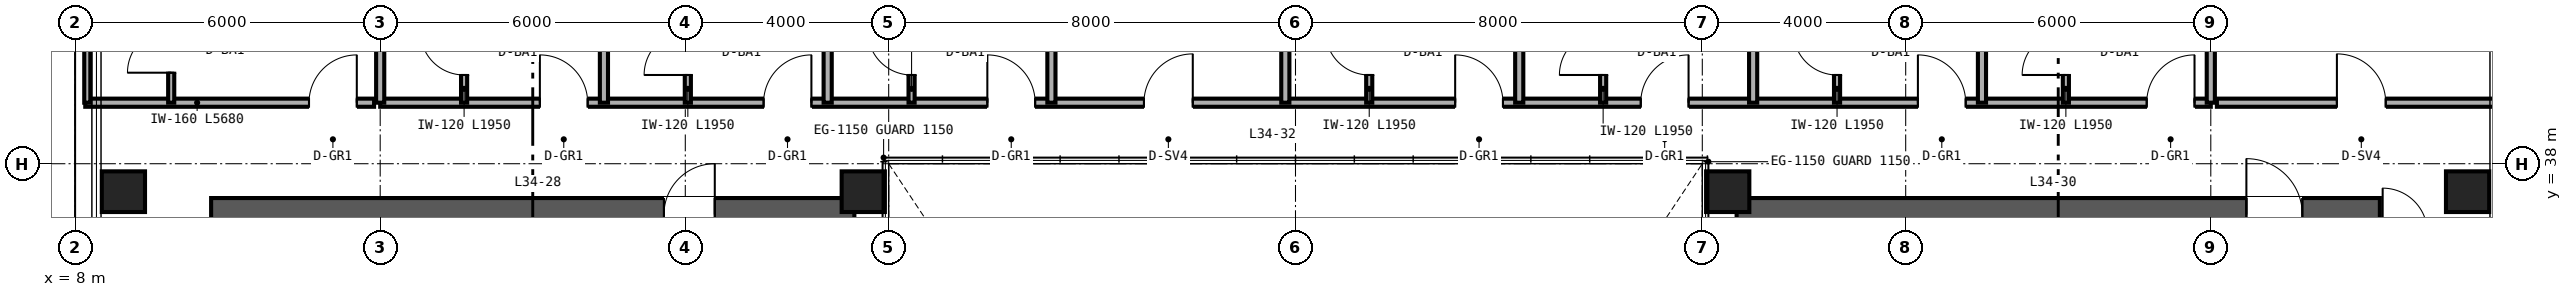
"""IFC4 building model, lengths in metres.
Left out: names, types, materials, properties, quantities, classifications, styles, units other than length and angle.
Written with IfcOpenShell. Run it as: python <this file> out.ifc"""

import sys

from ifc_helpers import new_model, si_unit, direction, frame, frame_2d, origin, origin_2d, place, context, subcontext, project, spatial, rectangle, hollow_rectangle, extrude, source, transform, mapped, element, fill, save


model = new_model("IFC4")
c1 = context("Model", 3, precision=1e-05, world=origin(), true_north=direction((0.0, 1.0)))
c2 = subcontext(c1, "Body", "Model", "MODEL_VIEW")
j1 = project(units=[si_unit("LENGTHUNIT", "METRE"), si_unit("PLANEANGLEUNIT", "RADIAN")], contexts=[c1])
p1 = place(None, origin())
s1 = spatial("IfcSite", under=j1, at=p1, CompositionType="ELEMENT")
p2 = place(p1, origin())
s2 = spatial("IfcBuilding", under=s1, at=p2, CompositionType="ELEMENT")
p3 = place(p2, frame((0.0, 0.0, 136.8)))
s3 = spatial("IfcBuildingStorey", under=s2, at=p3, CompositionType="ELEMENT", Elevation=136.8)
p4 = place(p3, frame((10.675, 37.0, 0.0), z_axis=(0.0, 0.0, 1.0), x_axis=(1.0, 0.0, 0.0)))
e1 = element("IfcWall", 1, at=p4, inside=s3, PredefinedType="SHEAR", context=c2, shape_type="SweptSolid", body=[
    extrude(rectangle(XDim=12.65, YDim=0.65, at=frame_2d((6.325, 0.0))), origin(), (0.0, 0.0, 1.0), 3.36),
])
p5 = place(p4, frame((8.905, 0.0, 0.0)))
e2 = element("IfcOpeningElement", 2, at=p5, cuts=e1, PredefinedType="OPENING", context=c2, shape_type="SweptSolid", body=[
    extrude(rectangle(XDim=1.0, YDim=2.15, at=frame_2d((0.5, 1.075))), frame((0.0, 0.335, 0.0), z_axis=(0.0, -1.0, 0.0), x_axis=(1.0, 0.0, 0.0)), (0.0, 0.0, 1.0), 0.67),
])
p6 = place(p3, frame((40.675, 37.0, 0.0), z_axis=(0.0, 0.0, 1.0), x_axis=(1.0, 0.0, 0.0)))
e3 = element("IfcWall", 3, at=p6, inside=s3, PredefinedType="SHEAR", context=c2, shape_type="SweptSolid", body=[
    extrude(rectangle(XDim=12.65, YDim=0.65, at=frame_2d((6.325, 0.0))), origin(), (0.0, 0.0, 1.0), 3.36),
])
p7 = place(p6, frame((10.025, 0.0, 0.0)))
e4 = element("IfcOpeningElement", 4, at=p7, cuts=e3, PredefinedType="OPENING", context=c2, shape_type="SweptSolid", body=[
    extrude(rectangle(XDim=1.1, YDim=2.15, at=frame_2d((0.55, 1.075))), frame((0.0, 0.335, 0.0), z_axis=(0.0, -1.0, 0.0), x_axis=(1.0, 0.0, 0.0)), (0.0, 0.0, 1.0), 0.67),
])
m1 = source(origin(), c2, "Body", "SweptSolid", [
    extrude(hollow_rectangle(XDim=0.85, YDim=0.8, WallThickness=0.032, at=origin_2d()), origin(), (0.0, 0.0, 1.0), 3.36),
])
for number, where, z_axis, x_axis in (
    (5, (8.95, 37.45, 0.0), (0.0, 0.0, 1.0), (1.0, 0.0, 0.0)),
    (6, (23.5, 37.45, 0.0), (0.0, 0.0, 1.0), (1.0, 0.0, 0.0)),
    (7, (40.5, 37.45, 0.0), (0.0, 0.0, 1.0), (1.0, 0.0, 0.0)),
    (8, (55.05, 37.45, 0.0), (0.0, 0.0, 1.0), (1.0, 0.0, 0.0)),
):
    element("IfcColumn", number, at=place(p3, frame(where, z_axis=z_axis, x_axis=x_axis)), inside=s3, PredefinedType="COLUMN", context=c2, shape_type="MappedRepresentation", body=[
        mapped(m1, transform((0.0, 0.0, 0.0), scale=1.0)),
    ])
p8 = place(p3, frame((8.2, 39.2, 0.0), z_axis=(0.0, 0.0, 1.0), x_axis=(1.0, 0.0, 0.0)))
e9 = element("IfcWall", 9, at=p8, inside=s3, PredefinedType="PARTITIONING", context=c2, shape_type="SweptSolid", body=[
    extrude(rectangle(XDim=5.68, YDim=0.16, at=frame_2d((2.84, 0.0))), origin(), (0.0, 0.0, 1.0), 3.36),
])
p9 = place(p8, frame((4.4, 0.0, 0.0)))
e10 = element("IfcOpeningElement", 10, at=p9, cuts=e9, PredefinedType="OPENING", context=c2, shape_type="SweptSolid", body=[
    extrude(rectangle(XDim=0.94, YDim=2.15, at=frame_2d((0.47, 1.075))), frame((0.0, 0.09, 0.0), z_axis=(0.0, -1.0, 0.0), x_axis=(1.0, 0.0, 0.0)), (0.0, 0.0, 1.0), 0.18),
])
p10 = place(p3, frame((9.89, 39.2, 0.0), z_axis=(0.0, 0.0, 1.0), x_axis=(0.0, 1.0, 0.0)))
e11 = element("IfcWall", 11, at=p10, inside=s3, PredefinedType="PARTITIONING", context=c2, shape_type="SweptSolid", body=[
    extrude(rectangle(XDim=2.04, YDim=0.12, at=frame_2d((1.02, 0.0))), origin(), (0.0, 0.0, 1.0), 3.36),
])
p11 = place(p10, frame((0.59, 0.0, 0.0)))
e12 = element("IfcOpeningElement", 12, at=p11, cuts=e11, PredefinedType="OPENING", context=c2, shape_type="SweptSolid", body=[
    extrude(rectangle(XDim=0.86, YDim=2.1, at=frame_2d((0.43, 1.05))), frame((0.0, 0.07, 0.0), z_axis=(0.0, -1.0, 0.0), x_axis=(1.0, 0.0, 0.0)), (0.0, 0.0, 1.0), 0.14),
])
p12 = place(p3, frame((8.24, 39.2, 0.0), z_axis=(0.0, 0.0, 1.0), x_axis=(0.0, 1.0, 0.0)))
e13 = element("IfcWall", 13, at=p12, inside=s3, PredefinedType="PARTITIONING", context=c2, shape_type="SweptSolid", body=[
    extrude(rectangle(XDim=2.04, YDim=0.12, at=frame_2d((1.02, 0.0))), origin(), (0.0, 0.0, 1.0), 3.36),
])
p13 = place(p3, frame((50.12, 39.2, 0.0), z_axis=(0.0, 0.0, 1.0), x_axis=(1.0, 0.0, 0.0)))
e14 = element("IfcWall", 14, at=p13, inside=s3, PredefinedType="PARTITIONING", context=c2, shape_type="SweptSolid", body=[
    extrude(rectangle(XDim=5.68, YDim=0.16, at=frame_2d((2.84, 0.0))), origin(), (0.0, 0.0, 1.0), 3.36),
])
p14 = place(p13, frame((2.36, 0.0, 0.0)))
e15 = element("IfcOpeningElement", 15, at=p14, cuts=e14, PredefinedType="OPENING", context=c2, shape_type="SweptSolid", body=[
    extrude(rectangle(XDim=0.96, YDim=2.15, at=frame_2d((0.48, 1.075))), frame((0.0, 0.09, 0.0), z_axis=(0.0, -1.0, 0.0), x_axis=(1.0, 0.0, 0.0)), (0.0, 0.0, 1.0), 0.18),
])
p15 = place(p3, frame((14.0, 39.2, 0.0), z_axis=(0.0, 0.0, 1.0), x_axis=(1.0, 0.0, 0.0)))
e16 = element("IfcWall", 16, at=p15, inside=s3, PredefinedType="PARTITIONING", context=c2, shape_type="SweptSolid", body=[
    extrude(rectangle(XDim=36.0, YDim=0.16, at=frame_2d((18.0, 0.0))), origin(), (0.0, 0.0, 1.0), 2.581),
])
p16 = place(p15, frame((3.14, 0.0, 0.0)))
e17 = element("IfcOpeningElement", 17, at=p16, cuts=e16, PredefinedType="OPENING", context=c2, shape_type="SweptSolid", body=[
    extrude(rectangle(XDim=0.94, YDim=2.15, at=frame_2d((0.47, 1.075))), frame((0.0, 0.09, 0.0), z_axis=(0.0, -1.0, 0.0), x_axis=(1.0, 0.0, 0.0)), (0.0, 0.0, 1.0), 0.18),
])
p17 = place(p15, frame((7.54, 0.0, 0.0)))
e18 = element("IfcOpeningElement", 18, at=p17, cuts=e16, PredefinedType="OPENING", context=c2, shape_type="SweptSolid", body=[
    extrude(rectangle(XDim=0.94, YDim=2.15, at=frame_2d((0.47, 1.075))), frame((0.0, 0.09, 0.0), z_axis=(0.0, -1.0, 0.0), x_axis=(1.0, 0.0, 0.0)), (0.0, 0.0, 1.0), 0.18),
])
p18 = place(p15, frame((11.94, 0.0, 0.0)))
e19 = element("IfcOpeningElement", 19, at=p18, cuts=e16, PredefinedType="OPENING", context=c2, shape_type="SweptSolid", body=[
    extrude(rectangle(XDim=0.94, YDim=2.15, at=frame_2d((0.47, 1.075))), frame((0.0, 0.09, 0.0), z_axis=(0.0, -1.0, 0.0), x_axis=(1.0, 0.0, 0.0)), (0.0, 0.0, 1.0), 0.18),
])
p19 = place(p15, frame((15.02, 0.0, 0.0)))
e20 = element("IfcOpeningElement", 20, at=p19, cuts=e16, PredefinedType="OPENING", context=c2, shape_type="SweptSolid", body=[
    extrude(rectangle(XDim=0.96, YDim=2.15, at=frame_2d((0.48, 1.075))), frame((0.0, 0.09, 0.0), z_axis=(0.0, -1.0, 0.0), x_axis=(1.0, 0.0, 0.0)), (0.0, 0.0, 1.0), 0.18),
])
p20 = place(p15, frame((21.14, 0.0, 0.0)))
e21 = element("IfcOpeningElement", 21, at=p20, cuts=e16, PredefinedType="OPENING", context=c2, shape_type="SweptSolid", body=[
    extrude(rectangle(XDim=0.94, YDim=2.15, at=frame_2d((0.47, 1.075))), frame((0.0, 0.09, 0.0), z_axis=(0.0, -1.0, 0.0), x_axis=(1.0, 0.0, 0.0)), (0.0, 0.0, 1.0), 0.18),
])
p21 = place(p15, frame((24.79, 0.0, 0.0)))
e22 = element("IfcOpeningElement", 22, at=p21, cuts=e16, PredefinedType="OPENING", context=c2, shape_type="SweptSolid", body=[
    extrude(rectangle(XDim=0.94, YDim=2.15, at=frame_2d((0.47, 1.075))), frame((0.0, 0.09, 0.0), z_axis=(0.0, -1.0, 0.0), x_axis=(1.0, 0.0, 0.0)), (0.0, 0.0, 1.0), 0.18),
])
p22 = place(p15, frame((30.24, 0.0, 0.0)))
e23 = element("IfcOpeningElement", 23, at=p22, cuts=e16, PredefinedType="OPENING", context=c2, shape_type="SweptSolid", body=[
    extrude(rectangle(XDim=0.94, YDim=2.15, at=frame_2d((0.47, 1.075))), frame((0.0, 0.09, 0.0), z_axis=(0.0, -1.0, 0.0), x_axis=(1.0, 0.0, 0.0)), (0.0, 0.0, 1.0), 0.18),
])
p23 = place(p15, frame((34.74, 0.0, 0.0)))
e24 = element("IfcOpeningElement", 24, at=p23, cuts=e16, PredefinedType="OPENING", context=c2, shape_type="SweptSolid", body=[
    extrude(rectangle(XDim=0.94, YDim=2.15, at=frame_2d((0.47, 1.075))), frame((0.0, 0.09, 0.0), z_axis=(0.0, -1.0, 0.0), x_axis=(1.0, 0.0, 0.0)), (0.0, 0.0, 1.0), 0.18),
])
for number, where, z_axis, x_axis in (
    (25, (14.0, 39.2, 0.0), (0.0, 0.0, 1.0), (0.0, 1.0, 0.0)),
    (26, (50.0, 39.2, 0.0), (0.0, 0.0, 1.0), (0.0, 1.0, 0.0)),
    (27, (18.4, 39.2, 0.0), (0.0, 0.0, 1.0), (0.0, 1.0, 0.0)),
):
    element("IfcWall", number, at=place(p3, frame(where, z_axis=z_axis, x_axis=x_axis)), inside=s3, PredefinedType="PARTITIONING", context=c2, shape_type="SweptSolid", body=[
        extrude(rectangle(XDim=10.44, YDim=0.16, at=frame_2d((5.22, 0.0))), origin(), (0.0, 0.0, 1.0), 2.667),
    ])
p24 = place(p3, frame((15.65, 39.2, 0.0), z_axis=(0.0, 0.0, 1.0), x_axis=(0.0, 1.0, 0.0)))
e28 = element("IfcWall", 28, at=p24, inside=s3, PredefinedType="PARTITIONING", context=c2, shape_type="SweptSolid", body=[
    extrude(rectangle(XDim=1.95, YDim=0.12, at=frame_2d((0.975, 0.0))), origin(), (0.0, 0.0, 1.0), 3.36),
])
p25 = place(p24, frame((0.545, 0.0, 0.0)))
e29 = element("IfcOpeningElement", 29, at=p25, cuts=e28, PredefinedType="OPENING", context=c2, shape_type="SweptSolid", body=[
    extrude(rectangle(XDim=0.86, YDim=2.1, at=frame_2d((0.43, 1.05))), frame((0.0, 0.07, 0.0), z_axis=(0.0, -1.0, 0.0), x_axis=(1.0, 0.0, 0.0)), (0.0, 0.0, 1.0), 0.14),
])
p26 = place(p3, frame((22.8, 39.2, 0.0), z_axis=(0.0, 0.0, 1.0), x_axis=(0.0, 1.0, 0.0)))
e30 = element("IfcWall", 30, at=p26, inside=s3, PredefinedType="PARTITIONING", context=c2, shape_type="SweptSolid", body=[
    extrude(rectangle(XDim=10.44, YDim=0.16, at=frame_2d((5.22, 0.0))), origin(), (0.0, 0.0, 1.0), 2.823),
])
p27 = place(p3, frame((20.05, 39.2, 0.0), z_axis=(0.0, 0.0, 1.0), x_axis=(0.0, 1.0, 0.0)))
e31 = element("IfcWall", 31, at=p27, inside=s3, PredefinedType="PARTITIONING", context=c2, shape_type="SweptSolid", body=[
    extrude(rectangle(XDim=1.95, YDim=0.12, at=frame_2d((0.975, 0.0))), origin(), (0.0, 0.0, 1.0), 3.36),
])
p28 = place(p27, frame((0.545, 0.0, 0.0)))
e32 = element("IfcOpeningElement", 32, at=p28, cuts=e31, PredefinedType="OPENING", context=c2, shape_type="SweptSolid", body=[
    extrude(rectangle(XDim=0.86, YDim=2.1, at=frame_2d((0.43, 1.05))), frame((0.0, 0.07, 0.0), z_axis=(0.0, -1.0, 0.0), x_axis=(1.0, 0.0, 0.0)), (0.0, 0.0, 1.0), 0.14),
])
p29 = place(p3, frame((27.2, 39.2, 0.0), z_axis=(0.0, 0.0, 1.0), x_axis=(0.0, 1.0, 0.0)))
e33 = element("IfcWall", 33, at=p29, inside=s3, PredefinedType="PARTITIONING", context=c2, shape_type="SweptSolid", body=[
    extrude(rectangle(XDim=10.44, YDim=0.16, at=frame_2d((5.22, 0.0))), origin(), (0.0, 0.0, 1.0), 2.433),
])
p30 = place(p3, frame((24.45, 39.2, 0.0), z_axis=(0.0, 0.0, 1.0), x_axis=(0.0, 1.0, 0.0)))
e34 = element("IfcWall", 34, at=p30, inside=s3, PredefinedType="PARTITIONING", context=c2, shape_type="SweptSolid", body=[
    extrude(rectangle(XDim=1.95, YDim=0.12, at=frame_2d((0.975, 0.0))), origin(), (0.0, 0.0, 1.0), 3.36),
])
p31 = place(p30, frame((0.545, 0.0, 0.0)))
e35 = element("IfcOpeningElement", 35, at=p31, cuts=e34, PredefinedType="OPENING", context=c2, shape_type="SweptSolid", body=[
    extrude(rectangle(XDim=0.86, YDim=2.1, at=frame_2d((0.43, 1.05))), frame((0.0, 0.07, 0.0), z_axis=(0.0, -1.0, 0.0), x_axis=(1.0, 0.0, 0.0)), (0.0, 0.0, 1.0), 0.14),
])
for number, where, z_axis, x_axis in (
    (36, (31.8, 39.2, 0.0), (0.0, 0.0, 1.0), (0.0, 1.0, 0.0)),
    (37, (36.4, 39.2, 0.0), (0.0, 0.0, 1.0), (0.0, 1.0, 0.0)),
):
    element("IfcWall", number, at=place(p3, frame(where, z_axis=z_axis, x_axis=x_axis)), inside=s3, PredefinedType="PARTITIONING", context=c2, shape_type="SweptSolid", body=[
        extrude(rectangle(XDim=10.44, YDim=0.16, at=frame_2d((5.22, 0.0))), origin(), (0.0, 0.0, 1.0), 2.433),
    ])
p32 = place(p3, frame((33.45, 39.2, 0.0), z_axis=(0.0, 0.0, 1.0), x_axis=(0.0, 1.0, 0.0)))
e38 = element("IfcWall", 38, at=p32, inside=s3, PredefinedType="PARTITIONING", context=c2, shape_type="SweptSolid", body=[
    extrude(rectangle(XDim=1.95, YDim=0.12, at=frame_2d((0.975, 0.0))), origin(), (0.0, 0.0, 1.0), 3.36),
])
p33 = place(p32, frame((0.545, 0.0, 0.0)))
e39 = element("IfcOpeningElement", 39, at=p33, cuts=e38, PredefinedType="OPENING", context=c2, shape_type="SweptSolid", body=[
    extrude(rectangle(XDim=0.86, YDim=2.1, at=frame_2d((0.43, 1.05))), frame((0.0, 0.07, 0.0), z_axis=(0.0, -1.0, 0.0), x_axis=(1.0, 0.0, 0.0)), (0.0, 0.0, 1.0), 0.14),
])
p34 = place(p3, frame((41.0, 39.2, 0.0), z_axis=(0.0, 0.0, 1.0), x_axis=(0.0, 1.0, 0.0)))
e40 = element("IfcWall", 40, at=p34, inside=s3, PredefinedType="PARTITIONING", context=c2, shape_type="SweptSolid", body=[
    extrude(rectangle(XDim=10.44, YDim=0.16, at=frame_2d((5.22, 0.0))), origin(), (0.0, 0.0, 1.0), 2.823),
])
p35 = place(p3, frame((38.05, 39.2, 0.0), z_axis=(0.0, 0.0, 1.0), x_axis=(0.0, 1.0, 0.0)))
e41 = element("IfcWall", 41, at=p35, inside=s3, PredefinedType="PARTITIONING", context=c2, shape_type="SweptSolid", body=[
    extrude(rectangle(XDim=1.95, YDim=0.12, at=frame_2d((0.975, 0.0))), origin(), (0.0, 0.0, 1.0), 3.36),
])
p36 = place(p35, frame((0.545, 0.0, 0.0)))
e42 = element("IfcOpeningElement", 42, at=p36, cuts=e41, PredefinedType="OPENING", context=c2, shape_type="SweptSolid", body=[
    extrude(rectangle(XDim=0.86, YDim=2.1, at=frame_2d((0.43, 1.05))), frame((0.0, 0.07, 0.0), z_axis=(0.0, -1.0, 0.0), x_axis=(1.0, 0.0, 0.0)), (0.0, 0.0, 1.0), 0.14),
])
p37 = place(p3, frame((45.5, 39.2, 0.0), z_axis=(0.0, 0.0, 1.0), x_axis=(0.0, 1.0, 0.0)))
e43 = element("IfcWall", 43, at=p37, inside=s3, PredefinedType="PARTITIONING", context=c2, shape_type="SweptSolid", body=[
    extrude(rectangle(XDim=10.44, YDim=0.16, at=frame_2d((5.22, 0.0))), origin(), (0.0, 0.0, 1.0), 2.667),
])
p38 = place(p3, frame((42.65, 39.2, 0.0), z_axis=(0.0, 0.0, 1.0), x_axis=(0.0, 1.0, 0.0)))
e44 = element("IfcWall", 44, at=p38, inside=s3, PredefinedType="PARTITIONING", context=c2, shape_type="SweptSolid", body=[
    extrude(rectangle(XDim=1.95, YDim=0.12, at=frame_2d((0.975, 0.0))), origin(), (0.0, 0.0, 1.0), 3.36),
])
p39 = place(p38, frame((0.545, 0.0, 0.0)))
e45 = element("IfcOpeningElement", 45, at=p39, cuts=e44, PredefinedType="OPENING", context=c2, shape_type="SweptSolid", body=[
    extrude(rectangle(XDim=0.86, YDim=2.1, at=frame_2d((0.43, 1.05))), frame((0.0, 0.07, 0.0), z_axis=(0.0, -1.0, 0.0), x_axis=(1.0, 0.0, 0.0)), (0.0, 0.0, 1.0), 0.14),
])
p40 = place(p3, frame((47.15, 39.2, 0.0), z_axis=(0.0, 0.0, 1.0), x_axis=(0.0, 1.0, 0.0)))
e46 = element("IfcWall", 46, at=p40, inside=s3, PredefinedType="PARTITIONING", context=c2, shape_type="SweptSolid", body=[
    extrude(rectangle(XDim=1.95, YDim=0.12, at=frame_2d((0.975, 0.0))), origin(), (0.0, 0.0, 1.0), 3.36),
])
p41 = place(p40, frame((0.545, 0.0, 0.0)))
e47 = element("IfcOpeningElement", 47, at=p41, cuts=e46, PredefinedType="OPENING", context=c2, shape_type="SweptSolid", body=[
    extrude(rectangle(XDim=0.86, YDim=2.1, at=frame_2d((0.43, 1.05))), frame((0.0, 0.07, 0.0), z_axis=(0.0, -1.0, 0.0), x_axis=(1.0, 0.0, 0.0)), (0.0, 0.0, 1.0), 0.14),
])
m2 = source(origin(), c2, "Body", "SweptSolid", [
    extrude(rectangle(XDim=1.0, YDim=2.15, at=frame_2d((0.5, 1.075))), frame((0.0, 0.025, 0.0), z_axis=(0.0, -1.0, 0.0), x_axis=(1.0, 0.0, 0.0)), (0.0, 0.0, 1.0), 0.05),
])
p42 = place(p5, origin())
e48 = element("IfcDoor", 48, at=p42, inside=s3, OperationType="SINGLE_SWING_RIGHT", PredefinedType="DOOR", context=c2, shape_type="MappedRepresentation", body=[
    mapped(m2, transform((0.0, 0.0, 0.0), scale=1.0)),
])
fill(e2, e48)
m3 = source(origin(), c2, "Body", "SweptSolid", [
    extrude(rectangle(XDim=1.1, YDim=2.15, at=frame_2d((0.55, 1.075))), frame((0.0, 0.025, 0.0), z_axis=(0.0, -1.0, 0.0), x_axis=(1.0, 0.0, 0.0)), (0.0, 0.0, 1.0), 0.05),
])
p43 = place(p7, origin())
e49 = element("IfcDoor", 49, at=p43, inside=s3, OperationType="SINGLE_SWING_LEFT", PredefinedType="DOOR", context=c2, shape_type="MappedRepresentation", body=[
    mapped(m3, transform((0.0, 0.0, 0.0), scale=1.0)),
])
fill(e4, e49)
m4 = source(origin(), c2, "Body", "SweptSolid", [
    extrude(rectangle(XDim=0.86, YDim=2.1, at=frame_2d((0.43, 1.05))), frame((0.0, 0.025, 0.0), z_axis=(0.0, -1.0, 0.0), x_axis=(1.0, 0.0, 0.0)), (0.0, 0.0, 1.0), 0.05),
])
p44 = place(p11, origin())
e50 = element("IfcDoor", 50, at=p44, inside=s3, OperationType="SINGLE_SWING_LEFT", PredefinedType="DOOR", context=c2, shape_type="MappedRepresentation", body=[
    mapped(m4, transform((0.0, 0.0, 0.0), scale=1.0)),
])
fill(e12, e50)
m5 = source(origin(), c2, "Body", "SweptSolid", [
    extrude(rectangle(XDim=0.94, YDim=2.15, at=frame_2d((0.47, 1.075))), frame((0.0, 0.025, 0.0), z_axis=(0.0, -1.0, 0.0), x_axis=(1.0, 0.0, 0.0)), (0.0, 0.0, 1.0), 0.05),
])
p45 = place(p9, origin())
e51 = element("IfcDoor", 51, at=p45, inside=s3, OperationType="SINGLE_SWING_RIGHT", PredefinedType="DOOR", context=c2, shape_type="MappedRepresentation", body=[
    mapped(m5, transform((0.0, 0.0, 0.0), scale=1.0)),
])
fill(e10, e51)
m6 = source(origin(), c2, "Body", "SweptSolid", [
    extrude(rectangle(XDim=0.96, YDim=2.15, at=frame_2d((0.48, 1.075))), frame((0.0, 0.025, 0.0), z_axis=(0.0, -1.0, 0.0), x_axis=(1.0, 0.0, 0.0)), (0.0, 0.0, 1.0), 0.05),
])
p46 = place(p14, origin())
e52 = element("IfcDoor", 52, at=p46, inside=s3, OperationType="SINGLE_SWING_LEFT", PredefinedType="DOOR", context=c2, shape_type="MappedRepresentation", body=[
    mapped(m6, transform((0.0, 0.0, 0.0), scale=1.0)),
])
fill(e15, e52)
p47 = place(p25, origin())
e53 = element("IfcDoor", 53, at=p47, inside=s3, OperationType="SINGLE_SWING_RIGHT", PredefinedType="DOOR", context=c2, shape_type="MappedRepresentation", body=[
    mapped(m4, transform((0.0, 0.0, 0.0), scale=1.0)),
])
fill(e29, e53)
p48 = place(p28, origin())
e54 = element("IfcDoor", 54, at=p48, inside=s3, OperationType="SINGLE_SWING_LEFT", PredefinedType="DOOR", context=c2, shape_type="MappedRepresentation", body=[
    mapped(m4, transform((0.0, 0.0, 0.0), scale=1.0)),
])
fill(e32, e54)
p49 = place(p31, origin())
e55 = element("IfcDoor", 55, at=p49, inside=s3, OperationType="SINGLE_SWING_RIGHT", PredefinedType="DOOR", context=c2, shape_type="MappedRepresentation", body=[
    mapped(m4, transform((0.0, 0.0, 0.0), scale=1.0)),
])
fill(e35, e55)
p50 = place(p33, origin())
e56 = element("IfcDoor", 56, at=p50, inside=s3, OperationType="SINGLE_SWING_RIGHT", PredefinedType="DOOR", context=c2, shape_type="MappedRepresentation", body=[
    mapped(m4, transform((0.0, 0.0, 0.0), scale=1.0)),
])
fill(e39, e56)
p51 = place(p36, origin())
e57 = element("IfcDoor", 57, at=p51, inside=s3, OperationType="SINGLE_SWING_LEFT", PredefinedType="DOOR", context=c2, shape_type="MappedRepresentation", body=[
    mapped(m4, transform((0.0, 0.0, 0.0), scale=1.0)),
])
fill(e42, e57)
p52 = place(p39, origin())
e58 = element("IfcDoor", 58, at=p52, inside=s3, OperationType="SINGLE_SWING_RIGHT", PredefinedType="DOOR", context=c2, shape_type="MappedRepresentation", body=[
    mapped(m4, transform((0.0, 0.0, 0.0), scale=1.0)),
])
fill(e45, e58)
p53 = place(p41, origin())
e59 = element("IfcDoor", 59, at=p53, inside=s3, OperationType="SINGLE_SWING_LEFT", PredefinedType="DOOR", context=c2, shape_type="MappedRepresentation", body=[
    mapped(m4, transform((0.0, 0.0, 0.0), scale=1.0)),
])
fill(e47, e59)
p54 = place(p16, origin())
e60 = element("IfcDoor", 60, at=p54, inside=s3, OperationType="SINGLE_SWING_LEFT", PredefinedType="DOOR", context=c2, shape_type="MappedRepresentation", body=[
    mapped(m5, transform((0.0, 0.0, 0.0), scale=1.0)),
])
fill(e17, e60)
p55 = place(p17, origin())
e61 = element("IfcDoor", 61, at=p55, inside=s3, OperationType="SINGLE_SWING_RIGHT", PredefinedType="DOOR", context=c2, shape_type="MappedRepresentation", body=[
    mapped(m5, transform((0.0, 0.0, 0.0), scale=1.0)),
])
fill(e18, e61)
p56 = place(p18, origin())
e62 = element("IfcDoor", 62, at=p56, inside=s3, OperationType="SINGLE_SWING_LEFT", PredefinedType="DOOR", context=c2, shape_type="MappedRepresentation", body=[
    mapped(m5, transform((0.0, 0.0, 0.0), scale=1.0)),
])
fill(e19, e62)
p57 = place(p19, origin())
e63 = element("IfcDoor", 63, at=p57, inside=s3, OperationType="SINGLE_SWING_RIGHT", PredefinedType="DOOR", context=c2, shape_type="MappedRepresentation", body=[
    mapped(m6, transform((0.0, 0.0, 0.0), scale=1.0)),
])
fill(e20, e63)
p58 = place(p20, origin())
e64 = element("IfcDoor", 64, at=p58, inside=s3, OperationType="SINGLE_SWING_LEFT", PredefinedType="DOOR", context=c2, shape_type="MappedRepresentation", body=[
    mapped(m5, transform((0.0, 0.0, 0.0), scale=1.0)),
])
fill(e21, e64)
p59 = place(p21, origin())
e65 = element("IfcDoor", 65, at=p59, inside=s3, OperationType="SINGLE_SWING_RIGHT", PredefinedType="DOOR", context=c2, shape_type="MappedRepresentation", body=[
    mapped(m5, transform((0.0, 0.0, 0.0), scale=1.0)),
])
fill(e22, e65)
p60 = place(p22, origin())
e66 = element("IfcDoor", 66, at=p60, inside=s3, OperationType="SINGLE_SWING_LEFT", PredefinedType="DOOR", context=c2, shape_type="MappedRepresentation", body=[
    mapped(m5, transform((0.0, 0.0, 0.0), scale=1.0)),
])
fill(e23, e66)
p61 = place(p23, origin())
e67 = element("IfcDoor", 67, at=p61, inside=s3, OperationType="SINGLE_SWING_RIGHT", PredefinedType="DOOR", context=c2, shape_type="MappedRepresentation", body=[
    mapped(m5, transform((0.0, 0.0, 0.0), scale=1.0)),
])
fill(e24, e67)
save(model, sys.argv[1])
